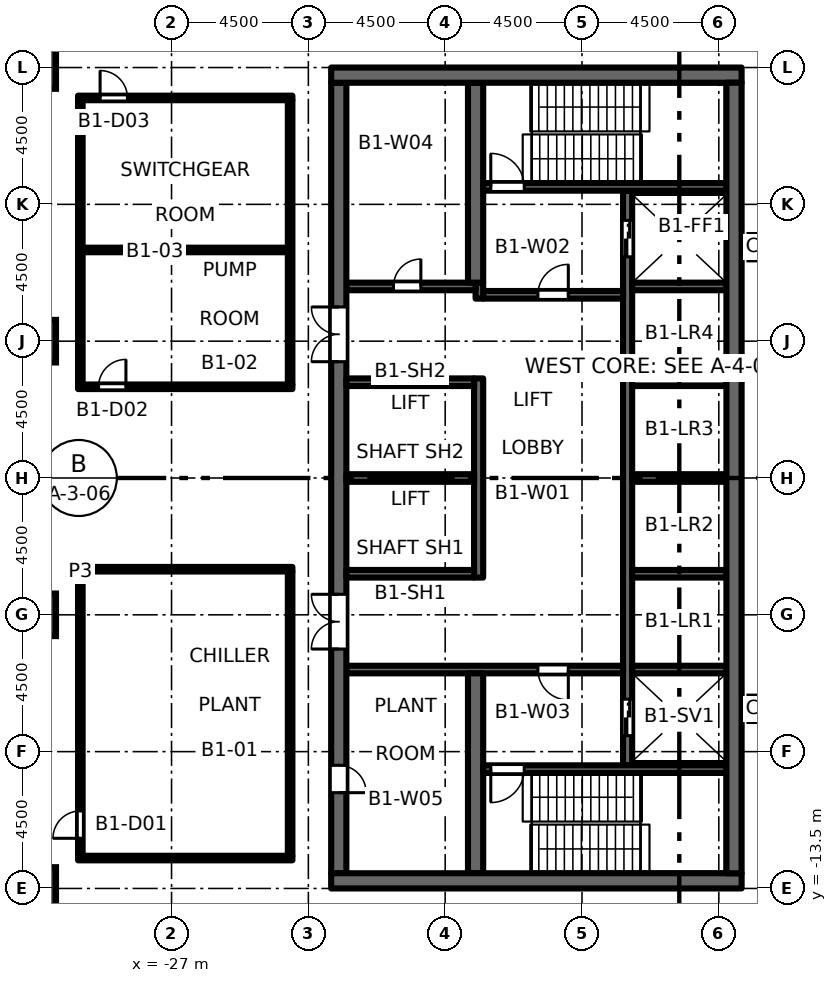
"""IFC4 building model, lengths in metres.
Left out: names, types, materials, properties, quantities, classifications, styles, units other than length and angle.
Written with IfcOpenShell. Run it as: python <this file> out.ifc"""

import sys

from ifc_helpers import new_model, si_unit, direction, frame, frame_2d, origin, origin_2d, place, context, subcontext, project, spatial, rectangle, hollow_rectangle, extrude, element, fill, save


model = new_model("IFC4")
c1 = context("Model", 3, precision=1e-05, world=origin(), true_north=direction((0.0, 1.0)))
c2 = subcontext(c1, "Body", "Model", "MODEL_VIEW")
j1 = project(units=[si_unit("LENGTHUNIT", "METRE"), si_unit("PLANEANGLEUNIT", "RADIAN")], contexts=[c1])
p1 = place(None, origin())
s1 = spatial("IfcSite", under=j1, at=p1, CompositionType="ELEMENT")
p2 = place(p1, origin())
s2 = spatial("IfcBuilding", under=s1, at=p2, CompositionType="ELEMENT")
p3 = place(p2, frame((0.0, 0.0, -5.0)))
s3 = spatial("IfcBuildingStorey", under=s2, at=p3, CompositionType="ELEMENT", Elevation=-5.0)
for number, where, z_axis, x_axis in (
    (1, (-31.5, 13.5, 0.0), (0.0, 0.0, 1.0), (1.0, 0.0, 0.0)),
    (2, (-31.5, 4.5, 0.0), (0.0, 0.0, 1.0), (1.0, 0.0, 0.0)),
    (3, (-31.5, -4.5, 0.0), (0.0, 0.0, 1.0), (1.0, 0.0, 0.0)),
    (4, (-31.5, -13.5, 0.0), (0.0, 0.0, 1.0), (1.0, 0.0, 0.0)),
):
    element("IfcColumn", number, at=place(p3, frame(where, z_axis=z_axis, x_axis=x_axis)), inside=s3, PredefinedType="COLUMN", context=c2, shape_type="SweptSolid", body=[
        extrude(hollow_rectangle(XDim=1.4, YDim=1.4, WallThickness=0.07, at=origin_2d()), origin(), (0.0, 0.0, 1.0), 5.0),
    ])
for number, where, z_axis, x_axis in (
    (5, (-7.591, -7.591, 0.0), (0.0, 0.0, 1.0), (1.0, 0.0, 0.0)),
    (6, (-7.591, 7.591, 0.0), (0.0, 0.0, 1.0), (1.0, 0.0, 0.0)),
):
    element("IfcColumn", number, at=place(p3, frame(where, z_axis=z_axis, x_axis=x_axis)), inside=s3, PredefinedType="COLUMN", context=c2, shape_type="SweptSolid", body=[
        extrude(hollow_rectangle(XDim=0.8, YDim=0.8, WallThickness=0.05, at=origin_2d()), origin(), (0.0, 0.0, 1.0), 5.0),
    ])
p4 = place(p3, frame((-12.0, -9.45, 0.0), z_axis=(0.0, 0.0, 1.0), x_axis=(0.0, 1.0, 0.0)))
e7 = element("IfcWall", 7, at=p4, inside=s3, PredefinedType="SHEAR", context=c2, shape_type="SweptSolid", body=[
    extrude(rectangle(XDim=18.9, YDim=0.3, at=frame_2d((9.45, 0.0))), origin(), (0.0, 0.0, 1.0), 4.55),
])
p5 = place(p4, frame((16.725, 0.0, 0.0)))
e8 = element("IfcOpeningElement", 8, at=p5, cuts=e7, PredefinedType="OPENING", context=c2, shape_type="SweptSolid", body=[
    extrude(rectangle(XDim=1.2, YDim=2.1, at=frame_2d((0.6, 1.05))), frame((0.0, 0.16, 0.0), z_axis=(0.0, -1.0, 0.0), x_axis=(1.0, 0.0, 0.0)), (0.0, 0.0, 1.0), 0.32),
])
p6 = place(p4, frame((0.975, 0.0, 0.0)))
e9 = element("IfcOpeningElement", 9, at=p6, cuts=e7, PredefinedType="OPENING", context=c2, shape_type="SweptSolid", body=[
    extrude(rectangle(XDim=1.2, YDim=2.1, at=frame_2d((0.6, 1.05))), frame((0.0, 0.16, 0.0), z_axis=(0.0, -1.0, 0.0), x_axis=(1.0, 0.0, 0.0)), (0.0, 0.0, 1.0), 0.32),
])
p7 = place(p3, frame((-12.15, 6.025, 0.0), z_axis=(0.0, 0.0, 1.0), x_axis=(-1.0, 0.0, 0.0)))
e10 = element("IfcWall", 10, at=p7, inside=s3, PredefinedType="SHEAR", context=c2, shape_type="SweptSolid", body=[
    extrude(rectangle(XDim=4.6, YDim=0.25, at=frame_2d((2.3, 0.0))), origin(), (0.0, 0.0, 1.0), 4.55),
])
p8 = place(p7, frame((1.8, 0.0, 0.0)))
e11 = element("IfcOpeningElement", 11, at=p8, cuts=e10, PredefinedType="OPENING", context=c2, shape_type="SweptSolid", body=[
    extrude(rectangle(XDim=1.0, YDim=2.1, at=frame_2d((0.5, 1.05))), frame((0.0, 0.135, 0.0), z_axis=(0.0, -1.0, 0.0), x_axis=(1.0, 0.0, 0.0)), (0.0, 0.0, 1.0), 0.27),
])
p9 = place(p3, frame((-16.875, 5.9, 0.0), z_axis=(0.0, 0.0, 1.0), x_axis=(0.0, 1.0, 0.0)))
e12 = element("IfcWall", 12, at=p9, inside=s3, PredefinedType="SHEAR", context=c2, shape_type="SweptSolid", body=[
    extrude(rectangle(XDim=0.525, YDim=0.25, at=frame_2d((0.263, 0.0))), origin(), (0.0, 0.0, 1.0), 4.55),
])
p10 = place(p3, frame((-17.0, 6.3, 0.0), z_axis=(0.0, 0.0, 1.0), x_axis=(-1.0, 0.0, 0.0)))
e13 = element("IfcWall", 13, at=p10, inside=s3, PredefinedType="SHEAR", context=c2, shape_type="SweptSolid", body=[
    extrude(rectangle(XDim=4.25, YDim=0.25, at=frame_2d((2.125, 0.0))), origin(), (0.0, 0.0, 1.0), 4.55),
])
p11 = place(p10, frame((1.8, 0.0, 0.0)))
e14 = element("IfcOpeningElement", 14, at=p11, cuts=e13, PredefinedType="OPENING", context=c2, shape_type="SweptSolid", body=[
    extrude(rectangle(XDim=0.9, YDim=2.1, at=frame_2d((0.45, 1.05))), frame((0.0, 0.135, 0.0), z_axis=(0.0, -1.0, 0.0), x_axis=(1.0, 0.0, 0.0)), (0.0, 0.0, 1.0), 0.27),
])
p12 = place(p3, frame((-12.15, -6.3, 0.0), z_axis=(0.0, 0.0, 1.0), x_axis=(-1.0, 0.0, 0.0)))
e15 = element("IfcWall", 15, at=p12, inside=s3, PredefinedType="SHEAR", context=c2, shape_type="SweptSolid", body=[
    extrude(rectangle(XDim=9.1, YDim=0.25, at=frame_2d((4.55, 0.0))), origin(), (0.0, 0.0, 1.0), 4.55),
])
p13 = place(p12, frame((1.8, 0.0, 0.0)))
e16 = element("IfcOpeningElement", 16, at=p13, cuts=e15, PredefinedType="OPENING", context=c2, shape_type="SweptSolid", body=[
    extrude(rectangle(XDim=1.0, YDim=2.1, at=frame_2d((0.5, 1.05))), frame((0.0, 0.135, 0.0), z_axis=(0.0, -1.0, 0.0), x_axis=(1.0, 0.0, 0.0)), (0.0, 0.0, 1.0), 0.27),
])
p14 = place(p3, frame((-21.5, -13.0, 0.0), z_axis=(0.0, 0.0, 1.0), x_axis=(0.0, 1.0, 0.0)))
e17 = element("IfcWall", 17, at=p14, inside=s3, PredefinedType="SHEAR", context=c2, shape_type="SweptSolid", body=[
    extrude(rectangle(XDim=26.0, YDim=0.5, at=frame_2d((13.0, 0.0))), origin(), (0.0, 0.0, 1.0), 4.55),
])
p15 = place(p14, frame((16.825, 0.0, 0.0)))
e18 = element("IfcOpeningElement", 18, at=p15, cuts=e17, PredefinedType="OPENING", context=c2, shape_type="SweptSolid", body=[
    extrude(rectangle(XDim=1.8, YDim=2.1, at=frame_2d((0.9, 1.05))), frame((0.0, 0.26, 0.0), z_axis=(0.0, -1.0, 0.0), x_axis=(1.0, 0.0, 0.0)), (0.0, 0.0, 1.0), 0.52),
])
p16 = place(p14, frame((7.375, 0.0, 0.0)))
e19 = element("IfcOpeningElement", 19, at=p16, cuts=e17, PredefinedType="OPENING", context=c2, shape_type="SweptSolid", body=[
    extrude(rectangle(XDim=1.8, YDim=2.1, at=frame_2d((0.9, 1.05))), frame((0.0, 0.26, 0.0), z_axis=(0.0, -1.0, 0.0), x_axis=(1.0, 0.0, 0.0)), (0.0, 0.0, 1.0), 0.52),
])
p17 = place(p14, frame((2.65, 0.0, 0.0)))
e20 = element("IfcOpeningElement", 20, at=p17, cuts=e17, PredefinedType="OPENING", context=c2, shape_type="SweptSolid", body=[
    extrude(rectangle(XDim=0.9, YDim=2.1, at=frame_2d((0.45, 1.05))), frame((0.0, 0.26, 0.0), z_axis=(0.0, -1.0, 0.0), x_axis=(1.0, 0.0, 0.0)), (0.0, 0.0, 1.0), 0.52),
])
p18 = place(p3, frame((-16.9, -3.275, 0.0), z_axis=(0.0, 0.0, 1.0), x_axis=(0.0, 1.0, 0.0)))
e21 = element("IfcWall", 21, at=p18, inside=s3, PredefinedType="SHEAR", context=c2, shape_type="SweptSolid", body=[
    extrude(rectangle(XDim=6.55, YDim=0.3, at=frame_2d((3.275, 0.0))), origin(), (0.0, 0.0, 1.0), 4.55),
])
for number, where, z_axis, x_axis in (
    (22, (-17.05, 0.0, 0.0), (0.0, 0.0, 1.0), (-1.0, 0.0, 0.0)),
    (23, (-17.05, 3.15, 0.0), (0.0, 0.0, 1.0), (-1.0, 0.0, 0.0)),
    (24, (-17.05, -3.15, 0.0), (0.0, 0.0, 1.0), (-1.0, 0.0, 0.0)),
):
    element("IfcWall", number, at=place(p3, frame(where, z_axis=z_axis, x_axis=x_axis)), inside=s3, PredefinedType="SHEAR", context=c2, shape_type="SweptSolid", body=[
        extrude(rectangle(XDim=4.2, YDim=0.25, at=frame_2d((2.1, 0.0))), origin(), (0.0, 0.0, 1.0), 4.55),
    ])
for number, where, z_axis, x_axis in (
    (25, (-17.0, 6.425, 0.0), (0.0, 0.0, 1.0), (0.0, 1.0, 0.0)),
    (26, (-17.0, -13.0, 0.0), (0.0, 0.0, 1.0), (0.0, 1.0, 0.0)),
):
    element("IfcWall", number, at=place(p3, frame(where, z_axis=z_axis, x_axis=x_axis)), inside=s3, PredefinedType="SHEAR", context=c2, shape_type="SweptSolid", body=[
        extrude(rectangle(XDim=6.575, YDim=0.5, at=frame_2d((3.288, 0.0))), origin(), (0.0, 0.0, 1.0), 4.55),
    ])
for number, where, z_axis, x_axis in (
    (27, (-8.75, 0.0, 0.0), (0.0, 0.0, 1.0), (-1.0, 0.0, 0.0)),
    (28, (-8.75, 3.15, 0.0), (0.0, 0.0, 1.0), (-1.0, 0.0, 0.0)),
    (29, (-8.75, 6.3, 0.0), (0.0, 0.0, 1.0), (-1.0, 0.0, 0.0)),
    (30, (-8.75, -3.15, 0.0), (0.0, 0.0, 1.0), (-1.0, 0.0, 0.0)),
    (31, (-8.75, -6.3, 0.0), (0.0, 0.0, 1.0), (-1.0, 0.0, 0.0)),
):
    element("IfcWall", number, at=place(p3, frame(where, z_axis=z_axis, x_axis=x_axis)), inside=s3, PredefinedType="SHEAR", context=c2, shape_type="SweptSolid", body=[
        extrude(rectangle(XDim=3.1, YDim=0.25, at=frame_2d((1.55, 0.0))), origin(), (0.0, 0.0, 1.0), 4.55),
    ])
p19 = place(p3, frame((-8.75, 9.575, 0.0), z_axis=(0.0, 0.0, 1.0), x_axis=(-1.0, 0.0, 0.0)))
e32 = element("IfcWall", 32, at=p19, inside=s3, PredefinedType="SHEAR", context=c2, shape_type="SweptSolid", body=[
    extrude(rectangle(XDim=8.0, YDim=0.25, at=frame_2d((4.0, 0.0))), origin(), (0.0, 0.0, 1.0), 4.55),
])
p20 = place(p19, frame((6.65, 0.0, 0.0)))
e33 = element("IfcOpeningElement", 33, at=p20, cuts=e32, PredefinedType="OPENING", context=c2, shape_type="SweptSolid", body=[
    extrude(rectangle(XDim=1.1, YDim=2.1, at=frame_2d((0.55, 1.05))), frame((0.0, 0.135, 0.0), z_axis=(0.0, -1.0, 0.0), x_axis=(1.0, 0.0, 0.0)), (0.0, 0.0, 1.0), 0.27),
])
p21 = place(p3, frame((-8.75, -9.575, 0.0), z_axis=(0.0, 0.0, 1.0), x_axis=(-1.0, 0.0, 0.0)))
e34 = element("IfcWall", 34, at=p21, inside=s3, PredefinedType="SHEAR", context=c2, shape_type="SweptSolid", body=[
    extrude(rectangle(XDim=8.0, YDim=0.25, at=frame_2d((4.0, 0.0))), origin(), (0.0, 0.0, 1.0), 4.55),
])
p22 = place(p21, frame((6.65, 0.0, 0.0)))
e35 = element("IfcOpeningElement", 35, at=p22, cuts=e34, PredefinedType="OPENING", context=c2, shape_type="SweptSolid", body=[
    extrude(rectangle(XDim=1.1, YDim=2.1, at=frame_2d((0.55, 1.05))), frame((0.0, 0.135, 0.0), z_axis=(0.0, -1.0, 0.0), x_axis=(1.0, 0.0, 0.0)), (0.0, 0.0, 1.0), 0.27),
])
for number, where, z_axis, x_axis in (
    (36, (-8.25, 13.25, 0.0), (0.0, 0.0, 1.0), (-1.0, 0.0, 0.0)),
    (37, (-8.25, -13.25, 0.0), (0.0, 0.0, 1.0), (-1.0, 0.0, 0.0)),
):
    element("IfcWall", number, at=place(p3, frame(where, z_axis=z_axis, x_axis=x_axis)), inside=s3, PredefinedType="SHEAR", context=c2, shape_type="SweptSolid", body=[
        extrude(rectangle(XDim=13.5, YDim=0.5, at=frame_2d((6.75, 0.0))), origin(), (0.0, 0.0, 1.0), 4.55),
    ])
p23 = place(p3, frame((-8.5, -13.0, 0.0), z_axis=(0.0, 0.0, 1.0), x_axis=(0.0, 1.0, 0.0)))
e38 = element("IfcWall", 38, at=p23, inside=s3, PredefinedType="SHEAR", context=c2, shape_type="SweptSolid", body=[
    extrude(rectangle(XDim=26.0, YDim=0.5, at=frame_2d((13.0, 0.0))), origin(), (0.0, 0.0, 1.0), 4.55),
])
for number, where, z_axis, x_axis in (
    (39, (-30.075, -12.5, 0.0), (0.0, 0.0, 1.0), (1.0, 0.0, 0.0)),
    (40, (-30.075, -3.0, 0.0), (0.0, 0.0, 1.0), (1.0, 0.0, 0.0)),
):
    element("IfcWall", number, at=place(p3, frame(where, z_axis=z_axis, x_axis=x_axis)), inside=s3, PredefinedType="PARTITIONING", context=c2, shape_type="SweptSolid", body=[
        extrude(rectangle(XDim=7.05, YDim=0.15, at=frame_2d((3.525, 0.0))), origin(), (0.0, 0.0, 1.0), 4.55),
    ])
p24 = place(p3, frame((-30.075, 3.0, 0.0), z_axis=(0.0, 0.0, 1.0), x_axis=(1.0, 0.0, 0.0)))
e41 = element("IfcWall", 41, at=p24, inside=s3, PredefinedType="PARTITIONING", context=c2, shape_type="SweptSolid", body=[
    extrude(rectangle(XDim=7.05, YDim=0.15, at=frame_2d((3.525, 0.0))), origin(), (0.0, 0.0, 1.0), 4.55),
])
p25 = place(p24, frame((0.675, 0.0, 0.0)))
e42 = element("IfcOpeningElement", 42, at=p25, cuts=e41, PredefinedType="OPENING", context=c2, shape_type="SweptSolid", body=[
    extrude(rectangle(XDim=0.9, YDim=2.1, at=frame_2d((0.45, 1.05))), frame((0.0, 0.085, 0.0), z_axis=(0.0, -1.0, 0.0), x_axis=(1.0, 0.0, 0.0)), (0.0, 0.0, 1.0), 0.17),
])
p26 = place(p3, frame((-29.925, 7.5, 0.0), z_axis=(0.0, 0.0, 1.0), x_axis=(1.0, 0.0, 0.0)))
e43 = element("IfcWall", 43, at=p26, inside=s3, PredefinedType="PARTITIONING", context=c2, shape_type="SweptSolid", body=[
    extrude(rectangle(XDim=6.75, YDim=0.15, at=frame_2d((3.375, 0.0))), origin(), (0.0, 0.0, 1.0), 4.55),
])
p27 = place(p3, frame((-30.075, 12.5, 0.0), z_axis=(0.0, 0.0, 1.0), x_axis=(1.0, 0.0, 0.0)))
e44 = element("IfcWall", 44, at=p27, inside=s3, PredefinedType="PARTITIONING", context=c2, shape_type="SweptSolid", body=[
    extrude(rectangle(XDim=7.05, YDim=0.15, at=frame_2d((3.525, 0.0))), origin(), (0.0, 0.0, 1.0), 4.55),
])
p28 = place(p27, frame((0.725, 0.0, 0.0)))
e45 = element("IfcOpeningElement", 45, at=p28, cuts=e44, PredefinedType="OPENING", context=c2, shape_type="SweptSolid", body=[
    extrude(rectangle(XDim=0.9, YDim=2.1, at=frame_2d((0.45, 1.05))), frame((0.0, 0.085, 0.0), z_axis=(0.0, -1.0, 0.0), x_axis=(1.0, 0.0, 0.0)), (0.0, 0.0, 1.0), 0.17),
])
p29 = place(p3, frame((-30.0, -12.425, 0.0), z_axis=(0.0, 0.0, 1.0), x_axis=(0.0, 1.0, 0.0)))
e46 = element("IfcWall", 46, at=p29, inside=s3, PredefinedType="PARTITIONING", context=c2, shape_type="SweptSolid", body=[
    extrude(rectangle(XDim=9.35, YDim=0.15, at=frame_2d((4.675, 0.0))), origin(), (0.0, 0.0, 1.0), 4.55),
])
p30 = place(p29, frame((0.575, 0.0, 0.0)))
e47 = element("IfcOpeningElement", 47, at=p30, cuts=e46, PredefinedType="OPENING", context=c2, shape_type="SweptSolid", body=[
    extrude(rectangle(XDim=0.9, YDim=2.1, at=frame_2d((0.45, 1.05))), frame((0.0, 0.085, 0.0), z_axis=(0.0, -1.0, 0.0), x_axis=(1.0, 0.0, 0.0)), (0.0, 0.0, 1.0), 0.17),
])
for number, where, z_axis, x_axis in (
    (48, (-30.0, 3.075, 0.0), (0.0, 0.0, 1.0), (0.0, 1.0, 0.0)),
    (49, (-23.1, -12.425, 0.0), (0.0, 0.0, 1.0), (0.0, 1.0, 0.0)),
    (50, (-23.1, 3.075, 0.0), (0.0, 0.0, 1.0), (0.0, 1.0, 0.0)),
):
    element("IfcWall", number, at=place(p3, frame(where, z_axis=z_axis, x_axis=x_axis)), inside=s3, PredefinedType="PARTITIONING", context=c2, shape_type="SweptSolid", body=[
        extrude(rectangle(XDim=9.35, YDim=0.15, at=frame_2d((4.675, 0.0))), origin(), (0.0, 0.0, 1.0), 4.55),
    ])
p31 = place(p8, origin())
e51 = element("IfcDoor", 51, at=p31, inside=s3, OperationType="SINGLE_SWING_LEFT", PredefinedType="DOOR", context=c2, shape_type="SweptSolid", body=[
    extrude(rectangle(XDim=1.0, YDim=2.1, at=frame_2d((0.5, 1.05))), frame((0.0, 0.025, 0.0), z_axis=(0.0, -1.0, 0.0), x_axis=(1.0, 0.0, 0.0)), (0.0, 0.0, 1.0), 0.05),
])
fill(e11, e51)
p32 = place(p13, origin())
e52 = element("IfcDoor", 52, at=p32, inside=s3, OperationType="SINGLE_SWING_RIGHT", PredefinedType="DOOR", context=c2, shape_type="SweptSolid", body=[
    extrude(rectangle(XDim=1.0, YDim=2.1, at=frame_2d((0.5, 1.05))), frame((0.0, 0.025, 0.0), z_axis=(0.0, -1.0, 0.0), x_axis=(1.0, 0.0, 0.0)), (0.0, 0.0, 1.0), 0.05),
])
fill(e16, e52)
p33 = place(p20, origin())
e53 = element("IfcDoor", 53, at=p33, inside=s3, OperationType="SINGLE_SWING_RIGHT", PredefinedType="DOOR", context=c2, shape_type="SweptSolid", body=[
    extrude(rectangle(XDim=1.1, YDim=2.1, at=frame_2d((0.55, 1.05))), frame((0.0, 0.025, 0.0), z_axis=(0.0, -1.0, 0.0), x_axis=(1.0, 0.0, 0.0)), (0.0, 0.0, 1.0), 0.05),
])
fill(e33, e53)
p34 = place(p22, origin())
e54 = element("IfcDoor", 54, at=p34, inside=s3, OperationType="SINGLE_SWING_LEFT", PredefinedType="DOOR", context=c2, shape_type="SweptSolid", body=[
    extrude(rectangle(XDim=1.1, YDim=2.1, at=frame_2d((0.55, 1.05))), frame((0.0, 0.025, 0.0), z_axis=(0.0, -1.0, 0.0), x_axis=(1.0, 0.0, 0.0)), (0.0, 0.0, 1.0), 0.05),
])
fill(e35, e54)
p35 = place(p15, origin())
e55 = element("IfcDoor", 55, at=p35, inside=s3, OperationType="DOUBLE_DOOR_DOUBLE_SWING", PredefinedType="DOOR", context=c2, shape_type="SweptSolid", body=[
    extrude(rectangle(XDim=1.8, YDim=2.1, at=frame_2d((0.9, 1.05))), frame((0.0, 0.025, 0.0), z_axis=(0.0, -1.0, 0.0), x_axis=(1.0, 0.0, 0.0)), (0.0, 0.0, 1.0), 0.05),
])
fill(e18, e55)
p36 = place(p16, origin())
e56 = element("IfcDoor", 56, at=p36, inside=s3, OperationType="DOUBLE_DOOR_DOUBLE_SWING", PredefinedType="DOOR", context=c2, shape_type="SweptSolid", body=[
    extrude(rectangle(XDim=1.8, YDim=2.1, at=frame_2d((0.9, 1.05))), frame((0.0, 0.025, 0.0), z_axis=(0.0, -1.0, 0.0), x_axis=(1.0, 0.0, 0.0)), (0.0, 0.0, 1.0), 0.05),
])
fill(e19, e56)
p37 = place(p5, origin())
e57 = element("IfcDoor", 57, at=p37, inside=s3, OperationType="DOUBLE_DOOR_SLIDING", PredefinedType="DOOR", context=c2, shape_type="SweptSolid", body=[
    extrude(rectangle(XDim=1.2, YDim=2.1, at=frame_2d((0.6, 1.05))), frame((0.0, 0.025, 0.0), z_axis=(0.0, -1.0, 0.0), x_axis=(1.0, 0.0, 0.0)), (0.0, 0.0, 1.0), 0.05),
])
fill(e8, e57)
p38 = place(p6, origin())
e58 = element("IfcDoor", 58, at=p38, inside=s3, OperationType="DOUBLE_DOOR_SLIDING", PredefinedType="DOOR", context=c2, shape_type="SweptSolid", body=[
    extrude(rectangle(XDim=1.2, YDim=2.1, at=frame_2d((0.6, 1.05))), frame((0.0, 0.025, 0.0), z_axis=(0.0, -1.0, 0.0), x_axis=(1.0, 0.0, 0.0)), (0.0, 0.0, 1.0), 0.05),
])
fill(e9, e58)
p39 = place(p11, origin())
e59 = element("IfcDoor", 59, at=p39, inside=s3, OperationType="SINGLE_SWING_LEFT", PredefinedType="DOOR", context=c2, shape_type="SweptSolid", body=[
    extrude(rectangle(XDim=0.9, YDim=2.1, at=frame_2d((0.45, 1.05))), frame((0.0, 0.025, 0.0), z_axis=(0.0, -1.0, 0.0), x_axis=(1.0, 0.0, 0.0)), (0.0, 0.0, 1.0), 0.05),
])
fill(e14, e59)
p40 = place(p17, origin())
e60 = element("IfcDoor", 60, at=p40, inside=s3, OperationType="SINGLE_SWING_LEFT", PredefinedType="DOOR", context=c2, shape_type="SweptSolid", body=[
    extrude(rectangle(XDim=0.9, YDim=2.1, at=frame_2d((0.45, 1.05))), frame((0.0, 0.025, 0.0), z_axis=(0.0, -1.0, 0.0), x_axis=(1.0, 0.0, 0.0)), (0.0, 0.0, 1.0), 0.05),
])
fill(e20, e60)
p41 = place(p30, origin())
e61 = element("IfcDoor", 61, at=p41, inside=s3, OperationType="SINGLE_SWING_LEFT", PredefinedType="DOOR", context=c2, shape_type="SweptSolid", body=[
    extrude(rectangle(XDim=0.9, YDim=2.1, at=frame_2d((0.45, 1.05))), frame((0.0, 0.025, 0.0), z_axis=(0.0, -1.0, 0.0), x_axis=(1.0, 0.0, 0.0)), (0.0, 0.0, 1.0), 0.05),
])
fill(e47, e61)
p42 = place(p25, origin())
e62 = element("IfcDoor", 62, at=p42, inside=s3, OperationType="SINGLE_SWING_RIGHT", PredefinedType="DOOR", context=c2, shape_type="SweptSolid", body=[
    extrude(rectangle(XDim=0.9, YDim=2.1, at=frame_2d((0.45, 1.05))), frame((0.0, 0.025, 0.0), z_axis=(0.0, -1.0, 0.0), x_axis=(1.0, 0.0, 0.0)), (0.0, 0.0, 1.0), 0.05),
])
fill(e42, e62)
p43 = place(p28, origin())
e63 = element("IfcDoor", 63, at=p43, inside=s3, OperationType="SINGLE_SWING_LEFT", PredefinedType="DOOR", context=c2, shape_type="SweptSolid", body=[
    extrude(rectangle(XDim=0.9, YDim=2.1, at=frame_2d((0.45, 1.05))), frame((0.0, 0.025, 0.0), z_axis=(0.0, -1.0, 0.0), x_axis=(1.0, 0.0, 0.0)), (0.0, 0.0, 1.0), 0.05),
])
fill(e45, e63)
save(model, sys.argv[1])
